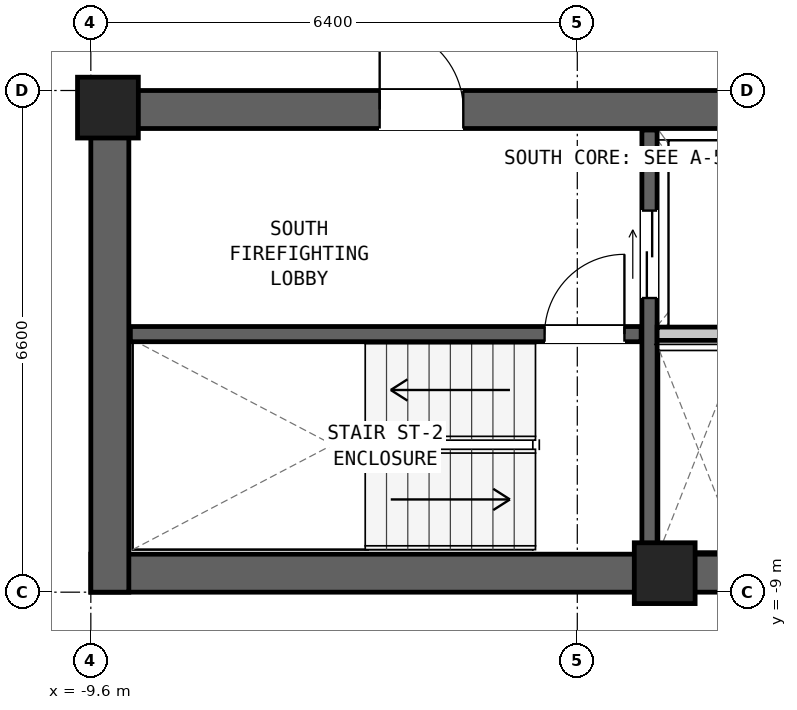
"""IFC4 building model, lengths in metres.
Left out: names, types, materials, properties, quantities, classifications, styles, units other than length and angle.
Written with IfcOpenShell. Run it as: python <this file> out.ifc"""

import sys

from ifc_helpers import new_model, si_unit, direction, frame, frame_2d, origin, origin_2d, place, context, subcontext, project, spatial, rectangle, extrude, element, fill, save


model = new_model("IFC4")
c1 = context("Model", 3, precision=1e-05, world=origin(), true_north=direction((0.0, 1.0)))
c2 = subcontext(c1, "Body", "Model", "MODEL_VIEW")
j1 = project(units=[si_unit("LENGTHUNIT", "METRE"), si_unit("PLANEANGLEUNIT", "RADIAN")], contexts=[c1])
p1 = place(None, origin())
s1 = spatial("IfcSite", under=j1, at=p1, CompositionType="ELEMENT")
p2 = place(p1, origin())
s2 = spatial("IfcBuilding", under=s1, at=p2, CompositionType="ELEMENT")
p3 = place(p2, frame((0.0, 0.0, 156.15)))
s3 = spatial("IfcBuildingStorey", under=s2, at=p3, CompositionType="ELEMENT", Elevation=156.15)
p4 = place(p3, frame((-9.6, -8.75, 0.0), z_axis=(0.0, 0.0, 1.0), x_axis=(1.0, 0.0, 0.0)))
e1 = element("IfcWall", 1, at=p4, inside=s3, PredefinedType="SHEAR", context=c2, shape_type="SweptSolid", body=[
    extrude(rectangle(XDim=19.2, YDim=0.5, at=frame_2d((9.6, 0.0))), origin(), (0.0, 0.0, 1.0), 3.05),
])
p5 = place(p3, frame((-9.6, -2.65, 0.0), z_axis=(0.0, 0.0, 1.0), x_axis=(1.0, 0.0, 0.0)))
e2 = element("IfcWall", 2, at=p5, inside=s3, PredefinedType="SHEAR", context=c2, shape_type="SweptSolid", body=[
    extrude(rectangle(XDim=19.2, YDim=0.5, at=frame_2d((9.6, 0.0))), origin(), (0.0, 0.0, 1.0), 3.05),
])
p6 = place(p5, frame((3.8, 0.0, 0.0)))
e3 = element("IfcOpeningElement", 3, at=p6, cuts=e2, PredefinedType="OPENING", context=c2, shape_type="SweptSolid", body=[
    extrude(rectangle(XDim=1.1, YDim=2.08, at=frame_2d((0.55, 1.04))), frame((0.0, 0.262, 0.0), z_axis=(0.0, -1.0, 0.0), x_axis=(1.0, 0.0, 0.0)), (0.0, 0.0, 1.0), 0.524),
])
p7 = place(p5, frame((12.2, 0.0, 0.0)))
e4 = element("IfcOpeningElement", 4, at=p7, cuts=e2, PredefinedType="OPENING", context=c2, shape_type="SweptSolid", body=[
    extrude(rectangle(XDim=1.6, YDim=2.12, at=frame_2d((0.8, 1.06))), frame((0.0, 0.262, 0.0), z_axis=(0.0, -1.0, 0.0), x_axis=(1.0, 0.0, 0.0)), (0.0, 0.0, 1.0), 0.524),
])
p8 = place(p5, frame((16.5, 0.0, 0.0)))
e5 = element("IfcOpeningElement", 5, at=p8, cuts=e2, PredefinedType="OPENING", context=c2, shape_type="SweptSolid", body=[
    extrude(rectangle(XDim=0.9, YDim=2.05, at=frame_2d((0.45, 1.025))), frame((0.0, 0.262, 0.0), z_axis=(0.0, -1.0, 0.0), x_axis=(1.0, 0.0, 0.0)), (0.0, 0.0, 1.0), 0.524),
])
p9 = place(p3, frame((-9.35, -9.0, 0.0), z_axis=(0.0, 0.0, 1.0), x_axis=(0.0, 1.0, 0.0)))
e6 = element("IfcWall", 6, at=p9, inside=s3, PredefinedType="SHEAR", context=c2, shape_type="SweptSolid", body=[
    extrude(rectangle(XDim=6.6, YDim=0.5, at=frame_2d((3.3, 0.0))), origin(), (0.0, 0.0, 1.0), 3.05),
])
for number, where, z_axis, x_axis in (
    (7, (-9.375, -2.625, 0.0), (0.0, 0.0, 1.0), (1.0, 0.0, 0.0)),
    (8, (-2.05, -8.75, 0.0), (0.0, 0.0, 1.0), (1.0, 0.0, 0.0)),
):
    element("IfcColumn", number, at=place(p3, frame(where, z_axis=z_axis, x_axis=x_axis)), inside=s3, PredefinedType="COLUMN", context=c2, shape_type="SweptSolid", body=[
        extrude(rectangle(XDim=0.8, YDim=0.8, at=origin_2d()), origin(), (0.0, 0.0, 1.0), 3.05),
    ])
p10 = place(p3, frame((-9.08, -5.605, 0.0), z_axis=(0.0, 0.0, 1.0), x_axis=(1.0, 0.0, 0.0)))
e9 = element("IfcWall", 9, at=p10, inside=s3, PredefinedType="SHEAR", context=c2, shape_type="SweptSolid", body=[
    extrude(rectangle(XDim=6.72, YDim=0.2, at=frame_2d((3.36, 0.0))), origin(), (0.0, 0.0, 1.0), 2.83),
])
p11 = place(p10, frame((5.45, 0.0, 0.0)))
e10 = element("IfcOpeningElement", 10, at=p11, cuts=e9, PredefinedType="OPENING", context=c2, shape_type="SweptSolid", body=[
    extrude(rectangle(XDim=1.05, YDim=2.08, at=frame_2d((0.525, 1.04))), frame((0.0, 0.112, 0.0), z_axis=(0.0, -1.0, 0.0), x_axis=(1.0, 0.0, 0.0)), (0.0, 0.0, 1.0), 0.224),
])
p12 = place(p3, frame((-2.25, -8.48, 0.0), z_axis=(0.0, 0.0, 1.0), x_axis=(0.0, 1.0, 0.0)))
e11 = element("IfcWall", 11, at=p12, inside=s3, PredefinedType="SHEAR", context=c2, shape_type="SweptSolid", body=[
    extrude(rectangle(XDim=5.56, YDim=0.2, at=frame_2d((2.78, 0.0))), origin(), (0.0, 0.0, 1.0), 2.83),
])
p13 = place(p12, frame((3.35, 0.0, 0.0)))
e12 = element("IfcOpeningElement", 12, at=p13, cuts=e11, PredefinedType="OPENING", context=c2, shape_type="SweptSolid", body=[
    extrude(rectangle(XDim=1.15, YDim=2.08, at=frame_2d((0.575, 1.04))), frame((0.0, 0.112, 0.0), z_axis=(0.0, -1.0, 0.0), x_axis=(1.0, 0.0, 0.0)), (0.0, 0.0, 1.0), 0.224),
])
p14 = place(p3, frame((-2.15, -5.6, 0.0), z_axis=(0.0, 0.0, 1.0), x_axis=(1.0, 0.0, 0.0)))
e13 = element("IfcWall", 13, at=p14, inside=s3, PredefinedType="PARTITIONING", context=c2, shape_type="SweptSolid", body=[
    extrude(rectangle(XDim=1.97, YDim=0.175, at=frame_2d((0.985, 0.0))), origin(), (0.0, 0.0, 1.0), 2.83),
])
p15 = place(p11, origin())
e14 = element("IfcDoor", 14, at=p15, inside=s3, OperationType="SINGLE_SWING_RIGHT", PredefinedType="DOOR", context=c2, shape_type="SweptSolid", body=[
    extrude(rectangle(XDim=1.05, YDim=2.08, at=frame_2d((0.525, 1.04))), frame((0.0, 0.025, 0.0), z_axis=(0.0, -1.0, 0.0), x_axis=(1.0, 0.0, 0.0)), (0.0, 0.0, 1.0), 0.05),
])
fill(e10, e14)
p16 = place(p6, origin())
e15 = element("IfcDoor", 15, at=p16, inside=s3, OperationType="SINGLE_SWING_LEFT", PredefinedType="DOOR", context=c2, shape_type="SweptSolid", body=[
    extrude(rectangle(XDim=1.1, YDim=2.08, at=frame_2d((0.55, 1.04))), frame((0.0, 0.025, 0.0), z_axis=(0.0, -1.0, 0.0), x_axis=(1.0, 0.0, 0.0)), (0.0, 0.0, 1.0), 0.05),
])
fill(e3, e15)
p17 = place(p13, origin())
e16 = element("IfcDoor", 16, at=p17, inside=s3, OperationType="DOUBLE_DOOR_SLIDING", PredefinedType="DOOR", context=c2, shape_type="SweptSolid", body=[
    extrude(rectangle(XDim=1.15, YDim=2.08, at=frame_2d((0.575, 1.04))), frame((0.0, 0.025, 0.0), z_axis=(0.0, -1.0, 0.0), x_axis=(1.0, 0.0, 0.0)), (0.0, 0.0, 1.0), 0.05),
])
fill(e12, e16)
save(model, sys.argv[1])
